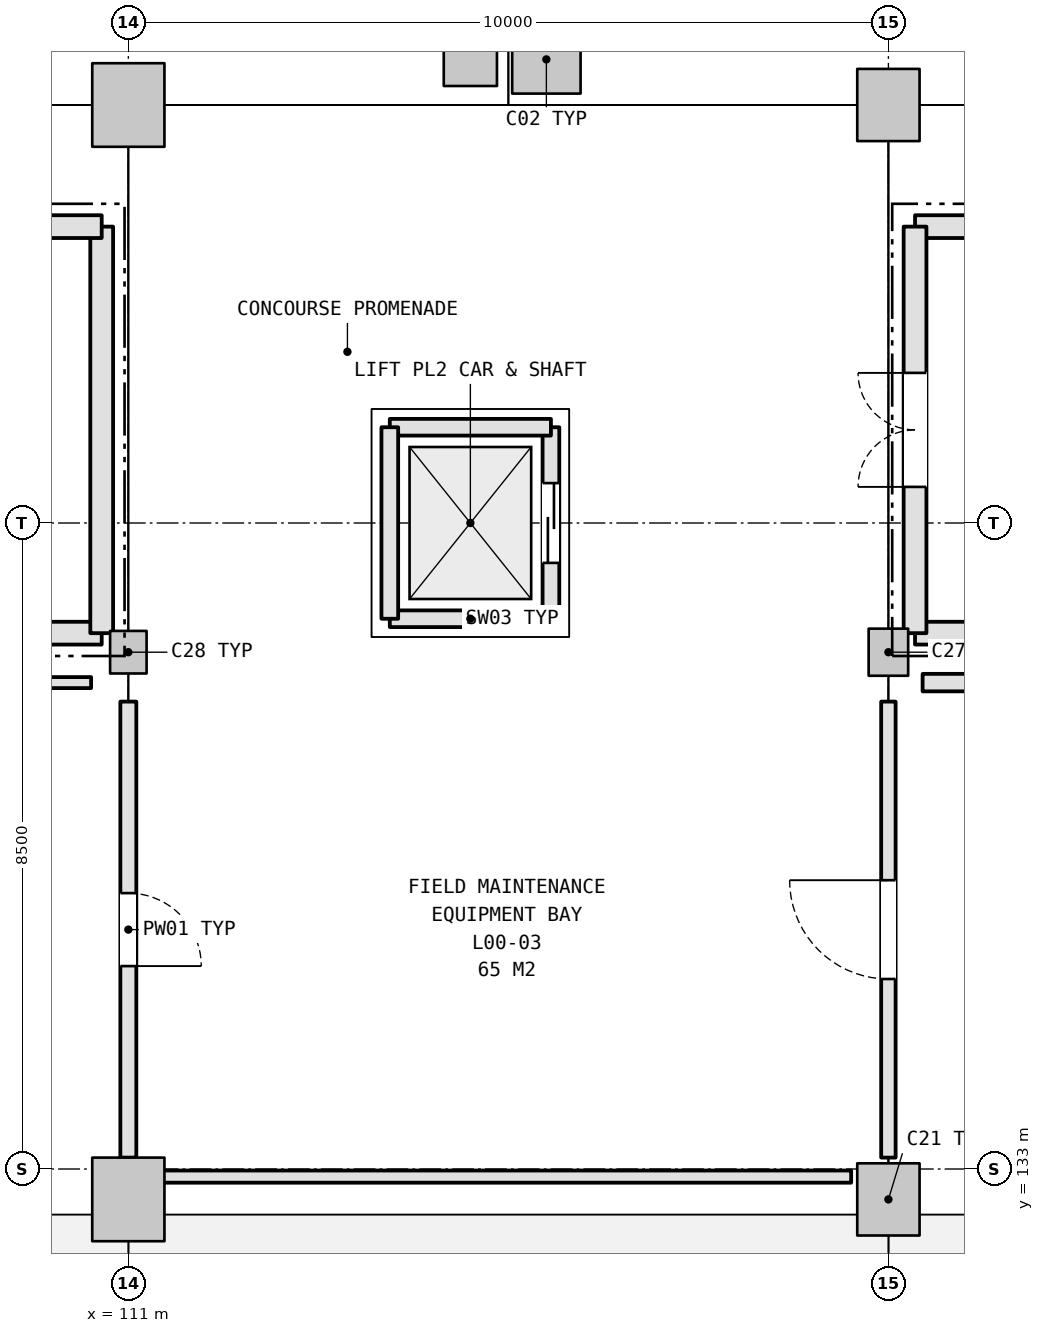
"""IFC4 building model, lengths in metres.
Left out: names, types, materials, properties, quantities, classifications, styles, units other than length and angle.
Written with IfcOpenShell. Run it as: python <this file> out.ifc"""

import sys

from ifc_helpers import new_model, si_unit, direction, frame, frame_2d, origin, origin_2d, place, context, subcontext, project, spatial, rectangle, extrude, element, fill, save


model = new_model("IFC4")
c1 = context("Model", 3, precision=1e-05, world=origin(), true_north=direction((0.0, 1.0)))
c2 = subcontext(c1, "Body", "Model", "MODEL_VIEW")
j1 = project(units=[si_unit("LENGTHUNIT", "METRE"), si_unit("PLANEANGLEUNIT", "RADIAN")], contexts=[c1])
p1 = place(None, origin())
s1 = spatial("IfcSite", under=j1, at=p1, CompositionType="ELEMENT")
p2 = place(p1, origin())
s2 = spatial("IfcBuilding", under=s1, at=p2, CompositionType="ELEMENT")
p3 = place(p2, origin())
s3 = spatial("IfcBuildingStorey", under=s2, at=p3, CompositionType="ELEMENT", Elevation=0.0)
p4 = place(p3, frame((121.0, 132.6, 0.0), z_axis=(0.0, 0.0, 1.0), x_axis=(1.0, 0.0, 0.0)))
e1 = element("IfcColumn", 1, at=p4, inside=s3, PredefinedType="COLUMN", context=c2, shape_type="SweptSolid", body=[
    extrude(rectangle(XDim=0.82, YDim=0.95, at=origin_2d()), origin(), (0.0, 0.0, 1.0), 5.4),
])
p5 = place(p3, frame((121.0, 139.8, 0.0), z_axis=(0.0, 0.0, 1.0), x_axis=(1.0, 0.0, 0.0)))
e2 = element("IfcColumn", 2, at=p5, inside=s3, PredefinedType="COLUMN", context=c2, shape_type="SweptSolid", body=[
    extrude(rectangle(XDim=0.52, YDim=0.62, at=origin_2d()), origin(), (0.0, 0.0, 1.0), 5.4),
])
p6 = place(p3, frame((121.0, 147.0, 0.0), z_axis=(0.0, 0.0, 1.0), x_axis=(1.0, 0.0, 0.0)))
e3 = element("IfcColumn", 3, at=p6, inside=s3, PredefinedType="COLUMN", context=c2, shape_type="SweptSolid", body=[
    extrude(rectangle(XDim=0.82, YDim=0.95, at=origin_2d()), origin(), (0.0, 0.0, 1.0), 5.4),
])
p7 = place(p3, frame((111.0, 132.6, 0.0), z_axis=(0.0, 0.0, 1.0), x_axis=(1.0, 0.0, 0.0)))
e4 = element("IfcColumn", 4, at=p7, inside=s3, PredefinedType="COLUMN", context=c2, shape_type="SweptSolid", body=[
    extrude(rectangle(XDim=0.95, YDim=1.1, at=origin_2d()), origin(), (0.0, 0.0, 1.0), 5.4),
])
p8 = place(p3, frame((111.0, 139.8, 0.0), z_axis=(0.0, 0.0, 1.0), x_axis=(1.0, 0.0, 0.0)))
e5 = element("IfcColumn", 5, at=p8, inside=s3, PredefinedType="COLUMN", context=c2, shape_type="SweptSolid", body=[
    extrude(rectangle(XDim=0.48, YDim=0.56, at=origin_2d()), origin(), (0.0, 0.0, 1.0), 5.4),
])
p9 = place(p3, frame((111.0, 147.0, 0.0), z_axis=(0.0, 0.0, 1.0), x_axis=(1.0, 0.0, 0.0)))
e6 = element("IfcColumn", 6, at=p9, inside=s3, PredefinedType="COLUMN", context=c2, shape_type="SweptSolid", body=[
    extrude(rectangle(XDim=0.95, YDim=1.1, at=origin_2d()), origin(), (0.0, 0.0, 1.0), 5.4),
])
p10 = place(p3, frame((116.5, 147.6, 0.0), z_axis=(0.0, 0.0, 1.0), x_axis=(1.0, 0.0, 0.0)))
e7 = element("IfcColumn", 7, at=p10, inside=s3, PredefinedType="COLUMN", context=c2, shape_type="SweptSolid", body=[
    extrude(rectangle(XDim=0.9, YDim=0.9, at=origin_2d()), origin(), (0.0, 0.0, 1.0), 5.4),
])
p11 = place(p3, frame((115.5, 147.6, 0.0), z_axis=(0.0, 0.0, 1.0), x_axis=(1.0, 0.0, 0.0)))
e8 = element("IfcColumn", 8, at=p11, inside=s3, PredefinedType="COLUMN", context=c2, shape_type="SweptSolid", body=[
    extrude(rectangle(XDim=0.7, YDim=0.7, at=origin_2d()), origin(), (0.0, 0.0, 1.0), 5.4),
])
for number, where, z_axis, x_axis in (
    (9, (121.35, 140.05, 0.0), (0.0, 0.0, 1.0), (1.0, 0.0, 0.0)),
    (10, (130.65, 145.4, 0.0), (0.0, 0.0, 1.0), (-1.0, 0.0, 0.0)),
):
    element("IfcWall", number, at=place(p3, frame(where, z_axis=z_axis, x_axis=x_axis)), inside=s3, PredefinedType="SHEAR", context=c2, shape_type="SweptSolid", body=[
        extrude(rectangle(XDim=9.299, YDim=0.3, at=frame_2d((4.65, 0.0))), origin(), (0.0, 0.0, 1.0), 5.14),
    ])
p12 = place(p3, frame((121.35, 145.4, 0.0), z_axis=(0.0, 0.0, 1.0), x_axis=(0.0, -1.0, 0.0)))
e11 = element("IfcWall", 11, at=p12, inside=s3, PredefinedType="SHEAR", context=c2, shape_type="SweptSolid", body=[
    extrude(rectangle(XDim=5.349, YDim=0.3, at=frame_2d((2.675, 0.0))), origin(), (0.0, 0.0, 1.0), 5.14),
])
p13 = place(p12, frame((1.925, 0.0, 0.0)))
e12 = element("IfcOpeningElement", 12, at=p13, cuts=e11, PredefinedType="OPENING", context=c2, shape_type="SweptSolid", body=[
    extrude(rectangle(XDim=1.5, YDim=2.2, at=frame_2d((0.75, 1.1))), frame((0.0, 0.16, 0.0), z_axis=(0.0, -1.0, 0.0), x_axis=(1.0, 0.0, 0.0)), (0.0, 0.0, 1.0), 0.32),
])
p14 = place(p3, frame((101.35, 140.05, 0.0), z_axis=(0.0, 0.0, 1.0), x_axis=(1.0, 0.0, 0.0)))
e13 = element("IfcWall", 13, at=p14, inside=s3, PredefinedType="SHEAR", context=c2, shape_type="SweptSolid", body=[
    extrude(rectangle(XDim=9.299, YDim=0.3, at=frame_2d((4.65, 0.0))), origin(), (0.0, 0.0, 1.0), 5.14),
])
p15 = place(p3, frame((110.65, 140.05, 0.0), z_axis=(0.0, 0.0, 1.0), x_axis=(0.0, 1.0, 0.0)))
e14 = element("IfcWall", 14, at=p15, inside=s3, PredefinedType="SHEAR", context=c2, shape_type="SweptSolid", body=[
    extrude(rectangle(XDim=5.349, YDim=0.3, at=frame_2d((2.675, 0.0))), origin(), (0.0, 0.0, 1.0), 5.14),
])
p16 = place(p3, frame((110.65, 145.4, 0.0), z_axis=(0.0, 0.0, 1.0), x_axis=(-1.0, 0.0, 0.0)))
e15 = element("IfcWall", 15, at=p16, inside=s3, PredefinedType="SHEAR", context=c2, shape_type="SweptSolid", body=[
    extrude(rectangle(XDim=9.299, YDim=0.3, at=frame_2d((4.65, 0.0))), origin(), (0.0, 0.0, 1.0), 5.14),
])
p17 = place(p3, frame((114.44, 140.24, -1.1), z_axis=(0.0, 0.0, 1.0), x_axis=(1.0, 0.0, 0.0)))
e16 = element("IfcWall", 16, at=p17, inside=s3, PredefinedType="SHEAR", context=c2, shape_type="SweptSolid", body=[
    extrude(rectangle(XDim=2.12, YDim=0.22, at=frame_2d((1.06, 0.0))), origin(), (0.0, 0.0, 1.0), 6.24),
])
p18 = place(p3, frame((116.56, 140.24, -1.1), z_axis=(0.0, 0.0, 1.0), x_axis=(0.0, 1.0, 0.0)))
e17 = element("IfcWall", 17, at=p18, inside=s3, PredefinedType="SHEAR", context=c2, shape_type="SweptSolid", body=[
    extrude(rectangle(XDim=2.52, YDim=0.22, at=frame_2d((1.26, 0.0))), origin(), (0.0, 0.0, 1.0), 6.24),
])
p19 = place(p18, frame((0.735, 0.0, 1.1)))
e18 = element("IfcOpeningElement", 18, at=p19, cuts=e17, PredefinedType="OPENING", context=c2, shape_type="SweptSolid", body=[
    extrude(rectangle(XDim=1.05, YDim=2.15, at=frame_2d((0.525, 1.075))), frame((0.0, 0.12, 0.0), z_axis=(0.0, -1.0, 0.0), x_axis=(1.0, 0.0, 0.0)), (0.0, 0.0, 1.0), 0.24),
])
p20 = place(p3, frame((116.56, 142.76, -1.1), z_axis=(0.0, 0.0, 1.0), x_axis=(-1.0, 0.0, 0.0)))
e19 = element("IfcWall", 19, at=p20, inside=s3, PredefinedType="SHEAR", context=c2, shape_type="SweptSolid", body=[
    extrude(rectangle(XDim=2.12, YDim=0.22, at=frame_2d((1.06, 0.0))), origin(), (0.0, 0.0, 1.0), 6.24),
])
p21 = place(p3, frame((114.44, 142.76, -1.1), z_axis=(0.0, 0.0, 1.0), x_axis=(0.0, -1.0, 0.0)))
e20 = element("IfcWall", 20, at=p21, inside=s3, PredefinedType="SHEAR", context=c2, shape_type="SweptSolid", body=[
    extrude(rectangle(XDim=2.52, YDim=0.22, at=frame_2d((1.26, 0.0))), origin(), (0.0, 0.0, 1.0), 6.24),
])
p22 = place(p3, frame((121.0, 133.15, 0.0), z_axis=(0.0, 0.0, 1.0), x_axis=(0.0, 1.0, 0.0)))
e21 = element("IfcWall", 21, at=p22, inside=s3, PredefinedType="PARTITIONING", context=c2, shape_type="SweptSolid", body=[
    extrude(rectangle(XDim=6.0, YDim=0.19, at=frame_2d((3.0, 0.0))), origin(), (0.0, 0.0, 1.0), 4.375),
])
p23 = place(p22, frame((2.35, 0.0, 0.0)))
e22 = element("IfcOpeningElement", 22, at=p23, cuts=e21, PredefinedType="OPENING", context=c2, shape_type="SweptSolid", body=[
    extrude(rectangle(XDim=1.3, YDim=2.2, at=frame_2d((0.65, 1.1))), frame((0.0, 0.105, 0.0), z_axis=(0.0, -1.0, 0.0), x_axis=(1.0, 0.0, 0.0)), (0.0, 0.0, 1.0), 0.21),
])
p24 = place(p3, frame((121.45, 139.4, 0.0), z_axis=(0.0, 0.0, 1.0), x_axis=(1.0, 0.0, 0.0)))
e23 = element("IfcWall", 23, at=p24, inside=s3, PredefinedType="PLUMBINGWALL", context=c2, shape_type="SweptSolid", body=[
    extrude(rectangle(XDim=9.06, YDim=0.23, at=frame_2d((4.53, 0.0))), origin(), (0.0, 0.0, 1.0), 5.12),
])
p25 = place(p3, frame((111.0, 133.15, 0.0), z_axis=(0.0, 0.0, 1.0), x_axis=(0.0, 1.0, 0.0)))
e24 = element("IfcWall", 24, at=p25, inside=s3, PredefinedType="PLUMBINGWALL", context=c2, shape_type="SweptSolid", body=[
    extrude(rectangle(XDim=6.0, YDim=0.21, at=frame_2d((3.0, 0.0))), origin(), (0.0, 0.0, 1.0), 4.365),
])
p26 = place(p25, frame((2.52, 0.0, 0.0)))
e25 = element("IfcOpeningElement", 25, at=p26, cuts=e24, PredefinedType="OPENING", context=c2, shape_type="SweptSolid", body=[
    extrude(rectangle(XDim=0.96, YDim=2.15, at=frame_2d((0.48, 1.075))), frame((0.0, 0.115, 0.0), z_axis=(0.0, -1.0, 0.0), x_axis=(1.0, 0.0, 0.0)), (0.0, 0.0, 1.0), 0.23),
])
p27 = place(p3, frame((120.51, 132.9, 0.0), z_axis=(0.0, 0.0, 1.0), x_axis=(-1.0, 0.0, 0.0)))
e26 = element("IfcWall", 26, at=p27, inside=s3, PredefinedType="PARTITIONING", context=c2, shape_type="SweptSolid", body=[
    extrude(rectangle(XDim=9.06, YDim=0.16, at=frame_2d((4.53, 0.0))), origin(), (0.0, 0.0, 1.0), 4.325),
])
p28 = place(p3, frame((101.45, 139.4, 0.0), z_axis=(0.0, 0.0, 1.0), x_axis=(1.0, 0.0, 0.0)))
e27 = element("IfcWall", 27, at=p28, inside=s3, PredefinedType="PARTITIONING", context=c2, shape_type="SweptSolid", body=[
    extrude(rectangle(XDim=9.06, YDim=0.145, at=frame_2d((4.53, 0.0))), origin(), (0.0, 0.0, 1.0), 5.12),
])
p29 = place(p13, frame((1.5, 0.0, 0.0), z_axis=(0.0, 0.0, 1.0), x_axis=(-1.0, 0.0, 0.0)))
e28 = element("IfcDoor", 28, at=p29, inside=s3, OperationType="DOUBLE_DOOR_SINGLE_SWING", PredefinedType="DOOR", context=c2, shape_type="SweptSolid", body=[
    extrude(rectangle(XDim=1.5, YDim=2.2, at=frame_2d((0.75, 1.1))), frame((0.0, 0.025, 0.0), z_axis=(0.0, -1.0, 0.0), x_axis=(1.0, 0.0, 0.0)), (0.0, 0.0, 1.0), 0.05),
])
fill(e12, e28)
p30 = place(p19, origin())
e29 = element("IfcDoor", 29, at=p30, inside=s3, OperationType="DOUBLE_DOOR_SLIDING", PredefinedType="DOOR", context=c2, shape_type="SweptSolid", body=[
    extrude(rectangle(XDim=1.05, YDim=2.15, at=frame_2d((0.525, 1.075))), frame((0.0, 0.025, 0.0), z_axis=(0.0, -1.0, 0.0), x_axis=(1.0, 0.0, 0.0)), (0.0, 0.0, 1.0), 0.05),
])
fill(e18, e29)
p31 = place(p23, origin())
e30 = element("IfcDoor", 30, at=p31, inside=s3, OperationType="SINGLE_SWING_RIGHT", PredefinedType="DOOR", context=c2, shape_type="SweptSolid", body=[
    extrude(rectangle(XDim=1.3, YDim=2.2, at=frame_2d((0.65, 1.1))), frame((0.0, 0.025, 0.0), z_axis=(0.0, -1.0, 0.0), x_axis=(1.0, 0.0, 0.0)), (0.0, 0.0, 1.0), 0.05),
])
fill(e22, e30)
p32 = place(p26, frame((0.96, 0.0, 0.0), z_axis=(0.0, 0.0, 1.0), x_axis=(-1.0, 0.0, 0.0)))
e31 = element("IfcDoor", 31, at=p32, inside=s3, OperationType="SINGLE_SWING_LEFT", PredefinedType="DOOR", context=c2, shape_type="SweptSolid", body=[
    extrude(rectangle(XDim=0.96, YDim=2.15, at=frame_2d((0.48, 1.075))), frame((0.0, 0.025, 0.0), z_axis=(0.0, -1.0, 0.0), x_axis=(1.0, 0.0, 0.0)), (0.0, 0.0, 1.0), 0.05),
])
fill(e25, e31)
save(model, sys.argv[1])
